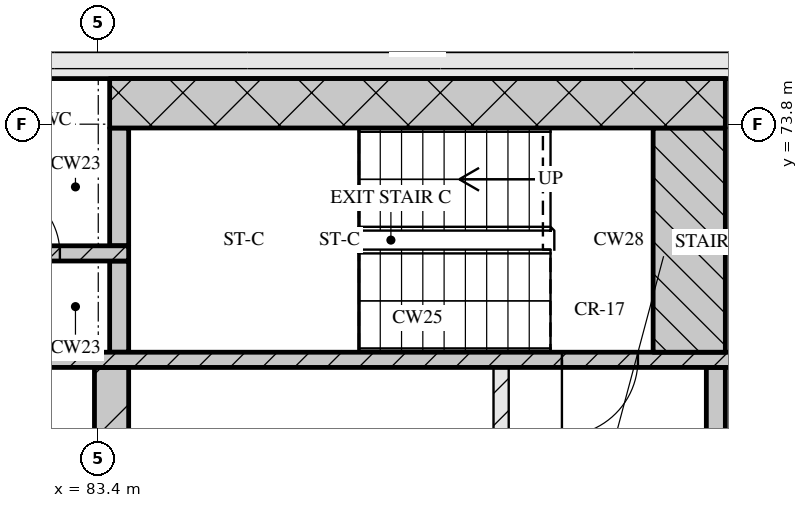
"""IFC4 building model, lengths in metres.
Left out: names, types, materials, properties, quantities, classifications, styles, units other than length and angle.
Written with IfcOpenShell. Run it as: python <this file> out.ifc"""

import sys

from ifc_helpers import new_model, si_unit, direction, frame, frame_2d, origin, place, context, subcontext, project, spatial, rectangle, extrude, element, fill, save


model = new_model("IFC4")
c1 = context("Model", 3, precision=1e-05, world=origin(), true_north=direction((0.0, 1.0)))
c2 = subcontext(c1, "Body", "Model", "MODEL_VIEW")
j1 = project(units=[si_unit("LENGTHUNIT", "METRE"), si_unit("PLANEANGLEUNIT", "RADIAN")], contexts=[c1])
p1 = place(None, origin())
s1 = spatial("IfcSite", under=j1, at=p1, CompositionType="ELEMENT")
p2 = place(p1, origin())
s2 = spatial("IfcBuilding", under=s1, at=p2, CompositionType="ELEMENT")
p3 = place(p2, frame((0.0, 0.0, 295.95)))
s3 = spatial("IfcBuildingStorey", under=s2, at=p3, CompositionType="ELEMENT", Elevation=295.95)
p4 = place(p3, frame((67.3, 74.65, 0.0), z_axis=(0.0, 0.0, 1.0), x_axis=(1.0, 0.0, 0.0)))
e1 = element("IfcWall", 1, at=p4, inside=s3, PredefinedType="SOLIDWALL", context=c2, shape_type="SweptSolid", body=[
    extrude(rectangle(XDim=40.6, YDim=0.5, at=frame_2d((20.3, 0.0))), origin(), (0.0, 0.0, 1.0), 3.32),
])
p5 = place(p3, frame((83.575, 68.0, 0.0), z_axis=(0.0, 0.0, 1.0), x_axis=(0.0, 1.0, 0.0)))
e2 = element("IfcWall", 2, at=p5, inside=s3, PredefinedType="SOLIDWALL", context=c2, shape_type="SweptSolid", body=[
    extrude(rectangle(XDim=2.6, YDim=0.45, at=frame_2d((1.3, 0.0))), origin(), (0.0, 0.0, 1.0), 3.32),
])
p6 = place(p3, frame((88.7, 68.0, 0.0), z_axis=(0.0, 0.0, 1.0), x_axis=(0.0, 1.0, 0.0)))
e3 = element("IfcWall", 3, at=p6, inside=s3, PredefinedType="PARTITIONING", context=c2, shape_type="SweptSolid", body=[
    extrude(rectangle(XDim=2.6, YDim=0.2, at=frame_2d((1.3, 0.0))), origin(), (0.0, 0.0, 1.0), 3.32),
])
p7 = place(p3, frame((91.525, 68.0, 0.0), z_axis=(0.0, 0.0, 1.0), x_axis=(0.0, 1.0, 0.0)))
e4 = element("IfcWall", 4, at=p7, inside=s3, PredefinedType="SOLIDWALL", context=c2, shape_type="SweptSolid", body=[
    extrude(rectangle(XDim=2.6, YDim=0.25, at=frame_2d((1.3, 0.0))), origin(), (0.0, 0.0, 1.0), 3.32),
])
p8 = place(p3, frame((67.8, 70.7, 0.0), z_axis=(0.0, 0.0, 1.0), x_axis=(1.0, 0.0, 0.0)))
e5 = element("IfcWall", 5, at=p8, inside=s3, PredefinedType="SOLIDWALL", context=c2, shape_type="SweptSolid", body=[
    extrude(rectangle(XDim=39.6, YDim=0.2, at=frame_2d((19.8, 0.0))), origin(), (0.0, 0.0, 1.0), 3.32),
])
p9 = place(p8, frame((0.65, 0.0, 0.0)))
e6 = element("IfcOpeningElement", 6, at=p9, cuts=e5, PredefinedType="OPENING", context=c2, shape_type="SweptSolid", body=[
    extrude(rectangle(XDim=1.1, YDim=2.1, at=frame_2d((0.55, 1.05))), frame((0.0, 0.11, 0.0), z_axis=(0.0, -1.0, 0.0), x_axis=(1.0, 0.0, 0.0)), (0.0, 0.0, 1.0), 0.22),
])
p10 = place(p8, frame((3.25, 0.0, 0.0)))
e7 = element("IfcOpeningElement", 7, at=p10, cuts=e5, PredefinedType="OPENING", context=c2, shape_type="SweptSolid", body=[
    extrude(rectangle(XDim=1.1, YDim=2.1, at=frame_2d((0.55, 1.05))), frame((0.0, 0.11, 0.0), z_axis=(0.0, -1.0, 0.0), x_axis=(1.0, 0.0, 0.0)), (0.0, 0.0, 1.0), 0.22),
])
p11 = place(p8, frame((5.9, 0.0, 0.0)))
e8 = element("IfcOpeningElement", 8, at=p11, cuts=e5, PredefinedType="OPENING", context=c2, shape_type="SweptSolid", body=[
    extrude(rectangle(XDim=1.0, YDim=2.1, at=frame_2d((0.5, 1.05))), frame((0.0, 0.11, 0.0), z_axis=(0.0, -1.0, 0.0), x_axis=(1.0, 0.0, 0.0)), (0.0, 0.0, 1.0), 0.22),
])
p12 = place(p8, frame((21.7, 0.0, 0.0)))
e9 = element("IfcOpeningElement", 9, at=p12, cuts=e5, PredefinedType="OPENING", context=c2, shape_type="SweptSolid", body=[
    extrude(rectangle(XDim=1.0, YDim=2.1, at=frame_2d((0.5, 1.05))), frame((0.0, 0.11, 0.0), z_axis=(0.0, -1.0, 0.0), x_axis=(1.0, 0.0, 0.0)), (0.0, 0.0, 1.0), 0.22),
])
p13 = place(p8, frame((32.7, 0.0, 0.0)))
e10 = element("IfcOpeningElement", 10, at=p13, cuts=e5, PredefinedType="OPENING", context=c2, shape_type="SweptSolid", body=[
    extrude(rectangle(XDim=1.0, YDim=2.1, at=frame_2d((0.5, 1.05))), frame((0.0, 0.11, 0.0), z_axis=(0.0, -1.0, 0.0), x_axis=(1.0, 0.0, 0.0)), (0.0, 0.0, 1.0), 0.22),
])
p14 = place(p8, frame((35.25, 0.0, 0.0)))
e11 = element("IfcOpeningElement", 11, at=p14, cuts=e5, PredefinedType="OPENING", context=c2, shape_type="SweptSolid", body=[
    extrude(rectangle(XDim=1.1, YDim=2.1, at=frame_2d((0.55, 1.05))), frame((0.0, 0.11, 0.0), z_axis=(0.0, -1.0, 0.0), x_axis=(1.0, 0.0, 0.0)), (0.0, 0.0, 1.0), 0.22),
])
p15 = place(p8, frame((37.85, 0.0, 0.0)))
e12 = element("IfcOpeningElement", 12, at=p15, cuts=e5, PredefinedType="OPENING", context=c2, shape_type="SweptSolid", body=[
    extrude(rectangle(XDim=1.1, YDim=2.1, at=frame_2d((0.55, 1.05))), frame((0.0, 0.11, 0.0), z_axis=(0.0, -1.0, 0.0), x_axis=(1.0, 0.0, 0.0)), (0.0, 0.0, 1.0), 0.22),
])
p16 = place(p3, frame((83.675, 70.8, 0.0), z_axis=(0.0, 0.0, 1.0), x_axis=(0.0, 1.0, 0.0)))
e13 = element("IfcWall", 13, at=p16, inside=s3, PredefinedType="SOLIDWALL", context=c2, shape_type="SweptSolid", body=[
    extrude(rectangle(XDim=1.2, YDim=0.25, at=frame_2d((0.6, 0.0))), origin(), (0.0, 0.0, 1.0), 3.32),
])
p17 = place(p3, frame((91.175, 70.8, 0.0), z_axis=(0.0, 0.0, 1.0), x_axis=(0.0, 1.0, 0.0)))
e14 = element("IfcWall", 14, at=p17, inside=s3, PredefinedType="SOLIDWALL", context=c2, shape_type="SweptSolid", body=[
    extrude(rectangle(XDim=2.95, YDim=0.95, at=frame_2d((1.475, 0.0))), origin(), (0.0, 0.0, 1.0), 3.32),
])
p18 = place(p3, frame((72.8, 72.1, 0.0), z_axis=(0.0, 0.0, 1.0), x_axis=(1.0, 0.0, 0.0)))
e15 = element("IfcWall", 15, at=p18, inside=s3, PredefinedType="SOLIDWALL", context=c2, shape_type="SweptSolid", body=[
    extrude(rectangle(XDim=11.0, YDim=0.2, at=frame_2d((5.5, 0.0))), origin(), (0.0, 0.0, 1.0), 3.32),
])
p19 = place(p18, frame((1.25, 0.0, 0.0)))
e16 = element("IfcOpeningElement", 16, at=p19, cuts=e15, PredefinedType="OPENING", context=c2, shape_type="SweptSolid", body=[
    extrude(rectangle(XDim=0.9, YDim=2.1, at=frame_2d((0.45, 1.05))), frame((0.0, 0.11, 0.0), z_axis=(0.0, -1.0, 0.0), x_axis=(1.0, 0.0, 0.0)), (0.0, 0.0, 1.0), 0.22),
])
p20 = place(p18, frame((3.85, 0.0, 0.0)))
e17 = element("IfcOpeningElement", 17, at=p20, cuts=e15, PredefinedType="OPENING", context=c2, shape_type="SweptSolid", body=[
    extrude(rectangle(XDim=0.9, YDim=2.1, at=frame_2d((0.45, 1.05))), frame((0.0, 0.11, 0.0), z_axis=(0.0, -1.0, 0.0), x_axis=(1.0, 0.0, 0.0)), (0.0, 0.0, 1.0), 0.22),
])
p21 = place(p18, frame((6.42, 0.0, 0.0)))
e18 = element("IfcOpeningElement", 18, at=p21, cuts=e15, PredefinedType="OPENING", context=c2, shape_type="SweptSolid", body=[
    extrude(rectangle(XDim=0.9, YDim=2.1, at=frame_2d((0.45, 1.05))), frame((0.0, 0.11, 0.0), z_axis=(0.0, -1.0, 0.0), x_axis=(1.0, 0.0, 0.0)), (0.0, 0.0, 1.0), 0.22),
])
p22 = place(p18, frame((9.195, 0.0, 0.0)))
e19 = element("IfcOpeningElement", 19, at=p22, cuts=e15, PredefinedType="OPENING", context=c2, shape_type="SweptSolid", body=[
    extrude(rectangle(XDim=0.9, YDim=2.1, at=frame_2d((0.45, 1.05))), frame((0.0, 0.11, 0.0), z_axis=(0.0, -1.0, 0.0), x_axis=(1.0, 0.0, 0.0)), (0.0, 0.0, 1.0), 0.22),
])
p23 = place(p3, frame((83.675, 72.2, 0.0), z_axis=(0.0, 0.0, 1.0), x_axis=(0.0, 1.0, 0.0)))
e20 = element("IfcWall", 20, at=p23, inside=s3, PredefinedType="SOLIDWALL", context=c2, shape_type="SweptSolid", body=[
    extrude(rectangle(XDim=1.55, YDim=0.25, at=frame_2d((0.775, 0.0))), origin(), (0.0, 0.0, 1.0), 3.32),
])
p24 = place(p3, frame((83.55, 74.075, 0.0), z_axis=(0.0, 0.0, 1.0), x_axis=(1.0, 0.0, 0.0)))
e21 = element("IfcWall", 21, at=p24, inside=s3, PredefinedType="SOLIDWALL", context=c2, shape_type="SweptSolid", body=[
    extrude(rectangle(XDim=8.1, YDim=0.65, at=frame_2d((4.05, 0.0))), origin(), (0.0, 0.0, 1.0), 3.32),
])
p25 = place(p12, origin())
e22 = element("IfcDoor", 22, at=p25, inside=s3, OperationType="SINGLE_SWING_RIGHT", PredefinedType="DOOR", context=c2, shape_type="SweptSolid", body=[
    extrude(rectangle(XDim=1.0, YDim=2.1, at=frame_2d((0.5, 1.05))), frame((0.0, 0.025, 0.0), z_axis=(0.0, -1.0, 0.0), x_axis=(1.0, 0.0, 0.0)), (0.0, 0.0, 1.0), 0.05),
])
fill(e9, e22)
p26 = place(p22, origin())
e23 = element("IfcDoor", 23, at=p26, inside=s3, OperationType="SINGLE_SWING_LEFT", PredefinedType="DOOR", context=c2, shape_type="SweptSolid", body=[
    extrude(rectangle(XDim=0.9, YDim=2.1, at=frame_2d((0.45, 1.05))), frame((0.0, 0.025, 0.0), z_axis=(0.0, -1.0, 0.0), x_axis=(1.0, 0.0, 0.0)), (0.0, 0.0, 1.0), 0.05),
])
fill(e19, e23)
save(model, sys.argv[1])
